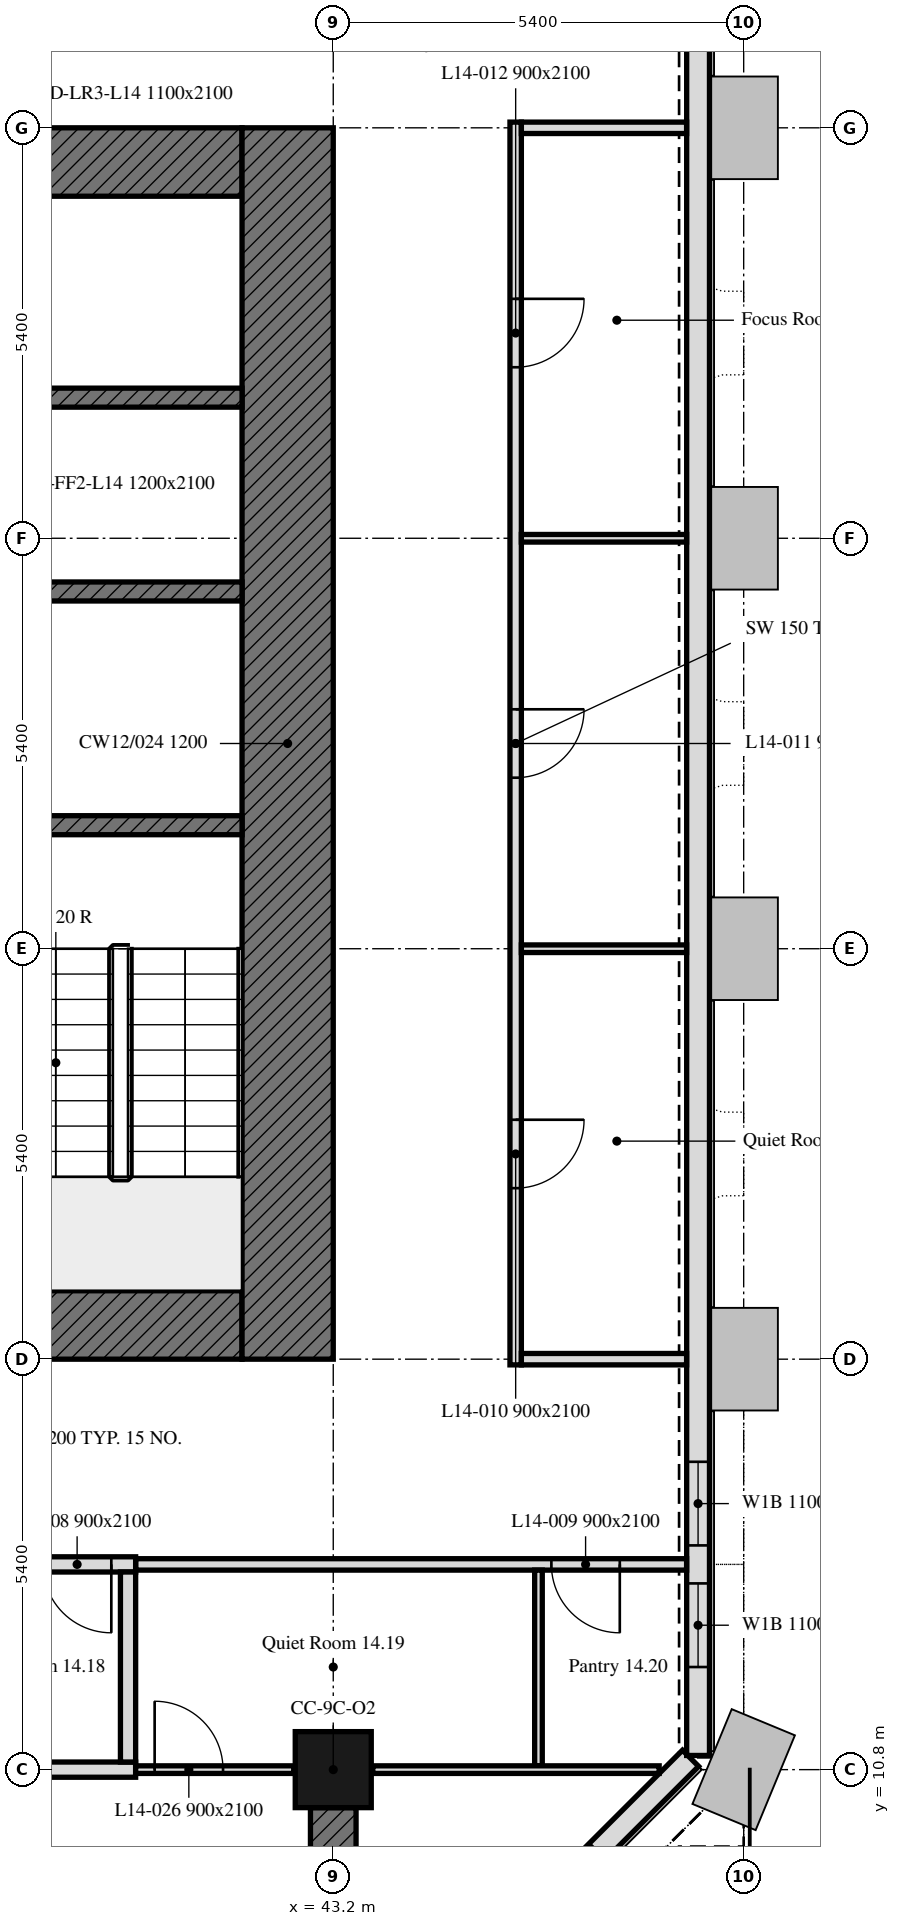
"""IFC4 building model, lengths in metres.
Left out: names, types, materials, properties, quantities, classifications, styles, units other than length and angle.
Written with IfcOpenShell. Run it as: python <this file> out.ifc"""

import sys

from ifc_helpers import new_model, si_unit, direction, frame, frame_2d, origin, origin_2d, place, context, subcontext, project, spatial, rectangle, extrude, element, fill, save


model = new_model("IFC4")
c1 = context("Model", 3, precision=1e-05, world=origin(), true_north=direction((0.0, 1.0)))
c2 = subcontext(c1, "Body", "Model", "MODEL_VIEW")
j1 = project(units=[si_unit("LENGTHUNIT", "METRE"), si_unit("PLANEANGLEUNIT", "RADIAN")], contexts=[c1])
p1 = place(None, origin())
s1 = spatial("IfcSite", under=j1, at=p1, CompositionType="ELEMENT")
p2 = place(p1, origin())
s2 = spatial("IfcBuilding", under=s1, at=p2, CompositionType="ELEMENT")
p3 = place(p2, frame((0.0, 0.0, 65.0)))
s3 = spatial("IfcBuildingStorey", under=s2, at=p3, CompositionType="ELEMENT", Elevation=65.0)
p4 = place(p3, frame((43.2, 10.8, 0.0), z_axis=(0.0, 0.0, 1.0), x_axis=(1.0, 0.0, 0.0)))
e1 = element("IfcColumn", 1, at=p4, inside=s3, PredefinedType="COLUMN", context=c2, shape_type="SweptSolid", body=[
    extrude(rectangle(XDim=1.0, YDim=1.0, at=origin_2d()), origin(), (0.0, 0.0, 1.0), 3.5),
])
p5 = place(p3, frame((43.2, 8.894, 0.0), z_axis=(0.0, 0.0, 1.0), x_axis=(0.0, 1.0, 0.0)))
e2 = element("IfcWall", 2, at=p5, inside=s3, PredefinedType="SHEAR", context=c2, shape_type="SweptSolid", body=[
    extrude(rectangle(XDim=1.406, YDim=0.6, at=frame_2d((0.703, 0.0))), origin(), (0.0, 0.0, 1.0), 3.5),
])
p6 = place(p3, frame((43.051, 6.099, 0.0), z_axis=(0.0, 0.0, 1.0), x_axis=(0.707106781187, 0.707106781187, 0.0)))
e3 = element("IfcWall", 3, at=p6, inside=s3, PredefinedType="SOLIDWALL", context=c2, shape_type="SweptSolid", body=[
    extrude(rectangle(XDim=6.86, YDim=0.3, at=frame_2d((3.43, 0.0))), origin(), (0.0, 0.0, 1.0), 3.5),
])
p7 = place(p6, frame((1.73, 0.0, 0.9)))
e4 = element("IfcOpeningElement", 4, at=p7, cuts=e3, PredefinedType="OPENING", context=c2, shape_type="SweptSolid", body=[
    extrude(rectangle(XDim=3.4, YDim=1.7, at=frame_2d((1.7, 0.85))), frame((0.0, 0.16, 0.0), z_axis=(0.0, -1.0, 0.0), x_axis=(1.0, 0.0, 0.0)), (0.0, 0.0, 1.0), 0.32),
])
p8 = place(p3, frame((48.0, 10.986, 0.0), z_axis=(0.0, 0.0, 1.0), x_axis=(0.0, 1.0, 0.0)))
e5 = element("IfcWall", 5, at=p8, inside=s3, PredefinedType="SOLIDWALL", context=c2, shape_type="SweptSolid", body=[
    extrude(rectangle(XDim=32.027, YDim=0.3, at=frame_2d((16.014, 0.0))), origin(), (0.0, 0.0, 1.0), 3.5),
])
p9 = place(p8, frame((1.164, 0.0, 0.9)))
e6 = element("IfcOpeningElement", 6, at=p9, cuts=e5, PredefinedType="OPENING", context=c2, shape_type="SweptSolid", body=[
    extrude(rectangle(XDim=1.1, YDim=1.7, at=frame_2d((0.55, 0.85))), frame((0.0, 0.16, 0.0), z_axis=(0.0, -1.0, 0.0), x_axis=(1.0, 0.0, 0.0)), (0.0, 0.0, 1.0), 0.32),
])
p10 = place(p8, frame((2.764, 0.0, 0.9)))
e7 = element("IfcOpeningElement", 7, at=p10, cuts=e5, PredefinedType="OPENING", context=c2, shape_type="SweptSolid", body=[
    extrude(rectangle(XDim=1.1, YDim=1.7, at=frame_2d((0.55, 0.85))), frame((0.0, 0.16, 0.0), z_axis=(0.0, -1.0, 0.0), x_axis=(1.0, 0.0, 0.0)), (0.0, 0.0, 1.0), 0.32),
])
p11 = place(p3, frame((42.0, 16.65, 0.0), z_axis=(0.0, 0.0, 1.0), x_axis=(-1.0, 0.0, 0.0)))
e8 = element("IfcWall", 8, at=p11, inside=s3, PredefinedType="SOLIDWALL", context=c2, shape_type="SweptSolid", body=[
    extrude(rectangle(XDim=11.1, YDim=0.9, at=frame_2d((5.55, 0.0))), origin(), (0.0, 0.0, 1.0), 3.5),
])
p12 = place(p11, frame((3.55, 0.0, 0.0)))
e9 = element("IfcOpeningElement", 9, at=p12, cuts=e8, PredefinedType="OPENING", context=c2, shape_type="SweptSolid", body=[
    extrude(rectangle(XDim=2.0, YDim=2.4, at=frame_2d((1.0, 1.2))), frame((0.0, 0.45, 0.0), z_axis=(0.0, -1.0, 0.0), x_axis=(1.0, 0.0, 0.0)), (0.0, 0.0, 1.0), 0.9),
])
p13 = place(p3, frame((30.9, 31.95, 0.0), z_axis=(0.0, 0.0, 1.0), x_axis=(1.0, 0.0, 0.0)))
e10 = element("IfcWall", 10, at=p13, inside=s3, PredefinedType="SOLIDWALL", context=c2, shape_type="SweptSolid", body=[
    extrude(rectangle(XDim=11.1, YDim=0.9, at=frame_2d((5.55, 0.0))), origin(), (0.0, 0.0, 1.0), 3.5),
])
p14 = place(p13, frame((5.55, 0.0, 0.0)))
e11 = element("IfcOpeningElement", 11, at=p14, cuts=e10, PredefinedType="OPENING", context=c2, shape_type="SweptSolid", body=[
    extrude(rectangle(XDim=2.0, YDim=2.4, at=frame_2d((1.0, 1.2))), frame((0.0, 0.45, 0.0), z_axis=(0.0, -1.0, 0.0), x_axis=(1.0, 0.0, 0.0)), (0.0, 0.0, 1.0), 0.9),
])
p15 = place(p3, frame((42.6, 32.4, 0.0), z_axis=(0.0, 0.0, 1.0), x_axis=(0.0, -1.0, 0.0)))
e12 = element("IfcWall", 12, at=p15, inside=s3, PredefinedType="SOLIDWALL", context=c2, shape_type="SweptSolid", body=[
    extrude(rectangle(XDim=16.2, YDim=1.2, at=frame_2d((8.1, 0.0))), origin(), (0.0, 0.0, 1.0), 3.5),
])
for number, where, z_axis, x_axis in (
    (13, (38.8, 23.225, 0.0), (0.0, 0.0, 1.0), (1.0, 0.0, 0.0)),
    (14, (38.8, 26.3, 0.0), (0.0, 0.0, 1.0), (1.0, 0.0, 0.0)),
    (15, (38.8, 28.85, 0.0), (0.0, 0.0, 1.0), (1.0, 0.0, 0.0)),
):
    element("IfcWall", number, at=place(p3, frame(where, z_axis=z_axis, x_axis=x_axis)), inside=s3, PredefinedType="SOLIDWALL", context=c2, shape_type="SweptSolid", body=[
        extrude(rectangle(XDim=3.2, YDim=0.25, at=frame_2d((1.6, 0.0))), origin(), (0.0, 0.0, 1.0), 3.5),
    ])
p16 = place(p3, frame((45.6, 32.475, 0.0), z_axis=(0.0, 0.0, 1.0), x_axis=(0.0, -1.0, 0.0)))
e16 = element("IfcWall", 16, at=p16, inside=s3, PredefinedType="PARTITIONING", context=c2, shape_type="SweptSolid", body=[
    extrude(rectangle(XDim=16.35, YDim=0.15, at=frame_2d((8.175, 0.0))), origin(), (0.0, 0.0, 1.0), 2.75),
])
p17 = place(p16, frame((13.125, 0.0, 0.0)))
e17 = element("IfcOpeningElement", 17, at=p17, cuts=e16, PredefinedType="OPENING", context=c2, shape_type="SweptSolid", body=[
    extrude(rectangle(XDim=0.9, YDim=2.1, at=frame_2d((0.45, 1.05))), frame((0.0, 0.075, 0.0), z_axis=(0.0, -1.0, 0.0), x_axis=(1.0, 0.0, 0.0)), (0.0, 0.0, 1.0), 0.15),
])
p18 = place(p16, frame((7.725, 0.0, 0.0)))
e18 = element("IfcOpeningElement", 18, at=p18, cuts=e16, PredefinedType="OPENING", context=c2, shape_type="SweptSolid", body=[
    extrude(rectangle(XDim=0.9, YDim=2.1, at=frame_2d((0.45, 1.05))), frame((0.0, 0.075, 0.0), z_axis=(0.0, -1.0, 0.0), x_axis=(1.0, 0.0, 0.0)), (0.0, 0.0, 1.0), 0.15),
])
p19 = place(p16, frame((2.325, 0.0, 0.0)))
e19 = element("IfcOpeningElement", 19, at=p19, cuts=e16, PredefinedType="OPENING", context=c2, shape_type="SweptSolid", body=[
    extrude(rectangle(XDim=0.9, YDim=2.1, at=frame_2d((0.45, 1.05))), frame((0.0, 0.075, 0.0), z_axis=(0.0, -1.0, 0.0), x_axis=(1.0, 0.0, 0.0)), (0.0, 0.0, 1.0), 0.15),
])
p20 = place(p3, frame((45.675, 16.2, 0.0), z_axis=(0.0, 0.0, 1.0), x_axis=(1.0, 0.0, 0.0)))
e20 = element("IfcWall", 20, at=p20, inside=s3, PredefinedType="PARTITIONING", context=c2, shape_type="SweptSolid", body=[
    extrude(rectangle(XDim=2.174, YDim=0.15, at=frame_2d((1.087, 0.0))), origin(), (0.0, 0.0, 1.0), 2.75),
])
p21 = place(p3, frame((47.849, 13.5, 0.0), z_axis=(0.0, 0.0, 1.0), x_axis=(-1.0, 0.0, 0.0)))
e21 = element("IfcWall", 21, at=p21, inside=s3, PredefinedType="PARTITIONING", context=c2, shape_type="SweptSolid", body=[
    extrude(rectangle(XDim=7.249, YDim=0.15, at=frame_2d((3.625, 0.0))), origin(), (0.0, 0.0, 1.0), 3.5),
])
p22 = place(p21, frame((0.879, 0.0, 0.0)))
e22 = element("IfcOpeningElement", 22, at=p22, cuts=e21, PredefinedType="OPENING", context=c2, shape_type="SweptSolid", body=[
    extrude(rectangle(XDim=0.9, YDim=2.1, at=frame_2d((0.45, 1.05))), frame((0.0, 0.075, 0.0), z_axis=(0.0, -1.0, 0.0), x_axis=(1.0, 0.0, 0.0)), (0.0, 0.0, 1.0), 0.15),
])
p23 = place(p3, frame((40.6, 13.5, 0.0), z_axis=(0.0, 0.0, 1.0), x_axis=(-1.0, 0.0, 0.0)))
e23 = element("IfcWall", 23, at=p23, inside=s3, PredefinedType="PARTITIONING", context=c2, shape_type="SweptSolid", body=[
    extrude(rectangle(XDim=2.9, YDim=0.2, at=frame_2d((1.45, 0.0))), origin(), (0.0, 0.0, 1.0), 3.5),
])
p24 = place(p23, frame((0.32, 0.0, 0.0)))
e24 = element("IfcOpeningElement", 24, at=p24, cuts=e23, PredefinedType="OPENING", context=c2, shape_type="SweptSolid", body=[
    extrude(rectangle(XDim=0.9, YDim=2.1, at=frame_2d((0.45, 1.05))), frame((0.0, 0.1, 0.0), z_axis=(0.0, -1.0, 0.0), x_axis=(1.0, 0.0, 0.0)), (0.0, 0.0, 1.0), 0.2),
])
p25 = place(p3, frame((47.849, 32.4, 0.0), z_axis=(0.0, 0.0, 1.0), x_axis=(-1.0, 0.0, 0.0)))
e25 = element("IfcWall", 25, at=p25, inside=s3, PredefinedType="PARTITIONING", context=c2, shape_type="SweptSolid", body=[
    extrude(rectangle(XDim=2.174, YDim=0.15, at=frame_2d((1.087, 0.0))), origin(), (0.0, 0.0, 1.0), 2.75),
])
p26 = place(p3, frame((38.32, 10.8, 0.0), z_axis=(0.0, 0.0, 1.0), x_axis=(1.0, 0.0, 0.0)))
e26 = element("IfcWall", 26, at=p26, inside=s3, PredefinedType="PARTITIONING", context=c2, shape_type="SweptSolid", body=[
    extrude(rectangle(XDim=2.28, YDim=0.2, at=frame_2d((1.14, 0.0))), origin(), (0.0, 0.0, 1.0), 3.5),
])
p27 = place(p3, frame((40.5, 10.9, 0.0), z_axis=(0.0, 0.0, 1.0), x_axis=(0.0, 1.0, 0.0)))
e27 = element("IfcWall", 27, at=p27, inside=s3, PredefinedType="PARTITIONING", context=c2, shape_type="SweptSolid", body=[
    extrude(rectangle(XDim=2.5, YDim=0.2, at=frame_2d((1.25, 0.0))), origin(), (0.0, 0.0, 1.0), 3.5),
])
p28 = place(p3, frame((40.6, 10.8, 0.0), z_axis=(0.0, 0.0, 1.0), x_axis=(1.0, 0.0, 0.0)))
e28 = element("IfcWall", 28, at=p28, inside=s3, PredefinedType="PARTITIONING", context=c2, shape_type="SweptSolid", body=[
    extrude(rectangle(XDim=2.08, YDim=0.1, at=frame_2d((1.04, 0.0))), origin(), (0.0, 0.0, 1.0), 3.5),
])
p29 = place(p28, frame((0.25, 0.0, 0.0)))
e29 = element("IfcOpeningElement", 29, at=p29, cuts=e28, PredefinedType="OPENING", context=c2, shape_type="SweptSolid", body=[
    extrude(rectangle(XDim=0.9, YDim=2.1, at=frame_2d((0.45, 1.05))), frame((0.0, 0.05, 0.0), z_axis=(0.0, -1.0, 0.0), x_axis=(1.0, 0.0, 0.0)), (0.0, 0.0, 1.0), 0.1),
])
p30 = place(p3, frame((45.9, 10.85, 0.0), z_axis=(0.0, 0.0, 1.0), x_axis=(0.0, 1.0, 0.0)))
e30 = element("IfcWall", 30, at=p30, inside=s3, PredefinedType="PARTITIONING", context=c2, shape_type="SweptSolid", body=[
    extrude(rectangle(XDim=2.575, YDim=0.1, at=frame_2d((1.288, 0.0))), origin(), (0.0, 0.0, 1.0), 3.5),
])
p31 = place(p3, frame((43.72, 10.8, 0.0), z_axis=(0.0, 0.0, 1.0), x_axis=(1.0, 0.0, 0.0)))
e31 = element("IfcWall", 31, at=p31, inside=s3, PredefinedType="PARTITIONING", context=c2, shape_type="SweptSolid", body=[
    extrude(rectangle(XDim=3.768, YDim=0.1, at=frame_2d((1.884, 0.0))), origin(), (0.0, 0.0, 1.0), 3.5),
])
for number, where, z_axis, x_axis in (
    (32, (45.675, 21.6, 0.0), (0.0, 0.0, 1.0), (1.0, 0.0, 0.0)),
    (33, (45.675, 27.0, 0.0), (0.0, 0.0, 1.0), (1.0, 0.0, 0.0)),
):
    element("IfcWall", number, at=place(p3, frame(where, z_axis=z_axis, x_axis=x_axis)), inside=s3, PredefinedType="PARTITIONING", context=c2, shape_type="SweptSolid", body=[
        extrude(rectangle(XDim=2.174, YDim=0.1, at=frame_2d((1.087, 0.0))), origin(), (0.0, 0.0, 1.0), 2.75),
    ])
p32 = place(p9, origin())
e34 = element("IfcWindow", 34, at=p32, inside=s3, PartitioningType="SINGLE_PANEL", PredefinedType="WINDOW", context=c2, shape_type="SweptSolid", body=[
    extrude(rectangle(XDim=1.1, YDim=1.7, at=frame_2d((0.55, 0.85))), frame((0.0, 0.03, 0.0), z_axis=(0.0, -1.0, 0.0), x_axis=(1.0, 0.0, 0.0)), (0.0, 0.0, 1.0), 0.06),
])
fill(e6, e34)
p33 = place(p10, origin())
e35 = element("IfcWindow", 35, at=p33, inside=s3, PartitioningType="SINGLE_PANEL", PredefinedType="WINDOW", context=c2, shape_type="SweptSolid", body=[
    extrude(rectangle(XDim=1.1, YDim=1.7, at=frame_2d((0.55, 0.85))), frame((0.0, 0.03, 0.0), z_axis=(0.0, -1.0, 0.0), x_axis=(1.0, 0.0, 0.0)), (0.0, 0.0, 1.0), 0.06),
])
fill(e7, e35)
p34 = place(p24, origin())
e36 = element("IfcDoor", 36, at=p34, inside=s3, OperationType="SINGLE_SWING_LEFT", PredefinedType="DOOR", context=c2, shape_type="SweptSolid", body=[
    extrude(rectangle(XDim=0.9, YDim=2.1, at=frame_2d((0.45, 1.05))), frame((0.0, 0.025, 0.0), z_axis=(0.0, -1.0, 0.0), x_axis=(1.0, 0.0, 0.0)), (0.0, 0.0, 1.0), 0.05),
])
fill(e24, e36)
p35 = place(p22, origin())
e37 = element("IfcDoor", 37, at=p35, inside=s3, OperationType="SINGLE_SWING_LEFT", PredefinedType="DOOR", context=c2, shape_type="SweptSolid", body=[
    extrude(rectangle(XDim=0.9, YDim=2.1, at=frame_2d((0.45, 1.05))), frame((0.0, 0.025, 0.0), z_axis=(0.0, -1.0, 0.0), x_axis=(1.0, 0.0, 0.0)), (0.0, 0.0, 1.0), 0.05),
])
fill(e22, e37)
p36 = place(p17, origin())
e38 = element("IfcDoor", 38, at=p36, inside=s3, OperationType="SINGLE_SWING_RIGHT", PredefinedType="DOOR", context=c2, shape_type="SweptSolid", body=[
    extrude(rectangle(XDim=0.9, YDim=2.1, at=frame_2d((0.45, 1.05))), frame((0.0, 0.025, 0.0), z_axis=(0.0, -1.0, 0.0), x_axis=(1.0, 0.0, 0.0)), (0.0, 0.0, 1.0), 0.05),
])
fill(e17, e38)
p37 = place(p18, origin())
e39 = element("IfcDoor", 39, at=p37, inside=s3, OperationType="SINGLE_SWING_RIGHT", PredefinedType="DOOR", context=c2, shape_type="SweptSolid", body=[
    extrude(rectangle(XDim=0.9, YDim=2.1, at=frame_2d((0.45, 1.05))), frame((0.0, 0.025, 0.0), z_axis=(0.0, -1.0, 0.0), x_axis=(1.0, 0.0, 0.0)), (0.0, 0.0, 1.0), 0.05),
])
fill(e18, e39)
p38 = place(p19, origin())
e40 = element("IfcDoor", 40, at=p38, inside=s3, OperationType="SINGLE_SWING_RIGHT", PredefinedType="DOOR", context=c2, shape_type="SweptSolid", body=[
    extrude(rectangle(XDim=0.9, YDim=2.1, at=frame_2d((0.45, 1.05))), frame((0.0, 0.025, 0.0), z_axis=(0.0, -1.0, 0.0), x_axis=(1.0, 0.0, 0.0)), (0.0, 0.0, 1.0), 0.05),
])
fill(e19, e40)
p39 = place(p29, origin())
e41 = element("IfcDoor", 41, at=p39, inside=s3, OperationType="SINGLE_SWING_LEFT", PredefinedType="DOOR", context=c2, shape_type="SweptSolid", body=[
    extrude(rectangle(XDim=0.9, YDim=2.1, at=frame_2d((0.45, 1.05))), frame((0.0, 0.025, 0.0), z_axis=(0.0, -1.0, 0.0), x_axis=(1.0, 0.0, 0.0)), (0.0, 0.0, 1.0), 0.05),
])
fill(e29, e41)
save(model, sys.argv[1])
